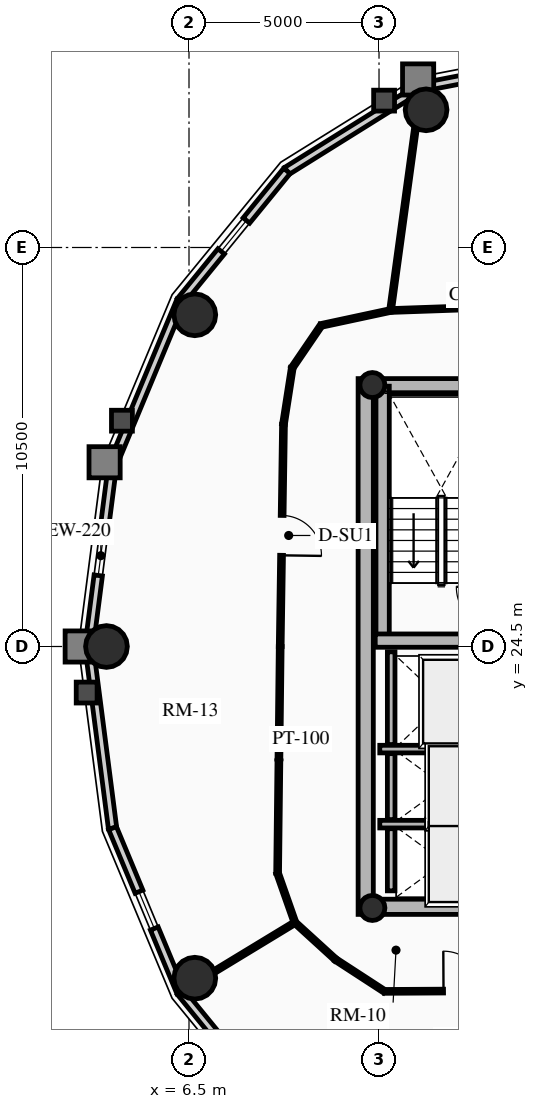
"""IFC4 building model, lengths in metres.
Left out: names, types, materials, properties, quantities, classifications, styles, units other than length and angle.
Written with IfcOpenShell. Run it as: python <this file> out.ifc"""

import sys

from ifc_helpers import new_model, si_unit, direction, frame, frame_2d, origin, origin_2d, place, context, subcontext, project, spatial, rectangle, circle, hollow_circle, extrude, source, transform, mapped, element, fill, save


model = new_model("IFC4")
c1 = context("Model", 3, precision=1e-05, world=origin(), true_north=direction((0.0, 1.0)))
c2 = subcontext(c1, "Body", "Model", "MODEL_VIEW")
j1 = project(units=[si_unit("LENGTHUNIT", "METRE"), si_unit("PLANEANGLEUNIT", "RADIAN")], contexts=[c1])
p1 = place(None, origin())
s1 = spatial("IfcSite", under=j1, at=p1, CompositionType="ELEMENT")
p2 = place(p1, origin())
s2 = spatial("IfcBuilding", under=s1, at=p2, CompositionType="ELEMENT")
p3 = place(p2, frame((0.0, 0.0, 202.48)))
s3 = spatial("IfcBuildingStorey", under=s2, at=p3, CompositionType="ELEMENT", Elevation=202.48)
p4 = place(p3, frame((11.15, 17.45, 0.0), z_axis=(0.0, 0.0, 1.0), x_axis=(0.0, 1.0, 0.0)))
e1 = element("IfcWall", 1, at=p4, inside=s3, PredefinedType="SHEAR", context=c2, shape_type="SweptSolid", body=[
    extrude(rectangle(XDim=14.1, YDim=0.4, at=frame_2d((7.05, 0.0))), origin(), (0.0, 0.0, 1.0), 2.91),
])
p5 = place(p3, frame((11.15, 17.65, 0.0), z_axis=(0.0, 0.0, 1.0), x_axis=(1.0, 0.0, 0.0)))
e2 = element("IfcWall", 2, at=p5, inside=s3, PredefinedType="SHEAR", context=c2, shape_type="SweptSolid", body=[
    extrude(rectangle(XDim=10.7, YDim=0.4, at=frame_2d((5.35, 0.0))), origin(), (0.0, 0.0, 1.0), 2.91),
])
m1 = source(origin(), c2, "Body", "SweptSolid", [
    extrude(rectangle(XDim=1.5, YDim=2.02, at=frame_2d((0.75, 1.01))), frame((0.0, 0.21, 0.0), z_axis=(0.0, -1.0, 0.0), x_axis=(1.0, 0.0, 0.0)), (0.0, 0.0, 1.0), 0.42),
])
p6 = place(p5, frame((5.45, 0.0, 0.0)))
e3 = element("IfcOpeningElement", 3, at=p6, cuts=e2, PredefinedType="OPENING", context=c2, shape_type="MappedRepresentation", body=[
    mapped(m1, transform((0.0, 0.0, 0.0), x_axis=(1.0, 0.0, 0.0), y_axis=(0.0, 1.0, 0.0), z_axis=(0.0, 0.0, 1.0), scale=1.0)),
])
p7 = place(p3, frame((11.15, 31.35, 0.0), z_axis=(0.0, 0.0, 1.0), x_axis=(1.0, 0.0, 0.0)))
e4 = element("IfcWall", 4, at=p7, inside=s3, PredefinedType="SHEAR", context=c2, shape_type="SweptSolid", body=[
    extrude(rectangle(XDim=10.7, YDim=0.4, at=frame_2d((5.35, 0.0))), origin(), (0.0, 0.0, 1.0), 2.91),
])
p8 = place(p7, frame((4.6, 0.0, 0.0)))
e5 = element("IfcOpeningElement", 5, at=p8, cuts=e4, PredefinedType="OPENING", context=c2, shape_type="MappedRepresentation", body=[
    mapped(m1, transform((0.0, 0.0, 0.0), x_axis=(1.0, 0.0, 0.0), y_axis=(0.0, 1.0, 0.0), z_axis=(0.0, 0.0, 1.0), scale=1.0)),
])
p9 = place(p3, frame((11.595, 24.655, 0.0), z_axis=(0.0, 0.0, 1.0), x_axis=(0.0, 1.0, 0.0)))
e6 = element("IfcWall", 6, at=p9, inside=s3, PredefinedType="SHEAR", context=c2, shape_type="SweptSolid", body=[
    extrude(rectangle(XDim=6.695, YDim=0.35, at=frame_2d((3.348, 0.0))), origin(), (0.0, 0.0, 1.0), 2.91),
])
p10 = place(p3, frame((11.4, 24.655, 0.0), z_axis=(0.0, 0.0, 1.0), x_axis=(1.0, 0.0, 0.0)))
e7 = element("IfcWall", 7, at=p10, inside=s3, PredefinedType="SHEAR", context=c2, shape_type="SweptSolid", body=[
    extrude(rectangle(XDim=3.285, YDim=0.35, at=frame_2d((1.643, 0.0))), origin(), (0.0, 0.0, 1.0), 2.91),
])
for number, where, z_axis, x_axis in (
    (8, (11.325, 17.62, 0.0), (0.0, 0.0, 1.0), (1.0, 0.0, 0.0)),
    (9, (11.325, 31.38, 0.0), (0.0, 0.0, 1.0), (1.0, 0.0, 0.0)),
):
    element("IfcColumn", number, at=place(p3, frame(where, z_axis=z_axis, x_axis=x_axis)), inside=s3, PredefinedType="COLUMN", context=c2, shape_type="SweptSolid", body=[
        extrude(hollow_circle(Radius=0.33, WallThickness=0.025, at=origin_2d()), origin(), (0.0, 0.0, 1.0), 2.91),
    ])
for number, where, z_axis, x_axis in (
    (10, (12.739, 38.623, 0.0), (0.0, 0.0, 1.0), (1.0, 0.0, 0.0)),
    (11, (6.653, 33.229, 0.0), (0.0, 0.0, 1.0), (1.0, 0.0, 0.0)),
    (12, (4.328, 24.5, 0.0), (0.0, 0.0, 1.0), (1.0, 0.0, 0.0)),
    (13, (6.653, 15.771, 0.0), (0.0, 0.0, 1.0), (1.0, 0.0, 0.0)),
):
    element("IfcColumn", number, at=place(p3, frame(where, z_axis=z_axis, x_axis=x_axis)), inside=s3, PredefinedType="USERDEFINED", context=c2, shape_type="SweptSolid", body=[
        extrude(circle(Radius=0.55, at=origin_2d()), origin(), (0.0, 0.0, 1.0), 2.91),
    ])
p11 = place(p3, frame((12.597, 39.213, 0.0), z_axis=(0.0, 0.0, 1.0), x_axis=(0.981700307484, 0.190432419211, 0.0)))
e14 = element("IfcWall", 14, at=p11, inside=s3, PredefinedType="SOLIDWALL", context=c2, shape_type="SweptSolid", body=[
    extrude(rectangle(XDim=3.976, YDim=0.22, at=frame_2d((1.988, 0.0))), origin(), (0.0, 0.0, 1.0), 2.322),
])
m2 = source(origin(), c2, "Body", "SweptSolid", [
    extrude(rectangle(XDim=1.05, YDim=1.3, at=frame_2d((0.525, 0.65))), frame((0.0, 0.12, 0.0), z_axis=(0.0, -1.0, 0.0), x_axis=(1.0, 0.0, 0.0)), (0.0, 0.0, 1.0), 0.24),
])
p12 = place(p11, frame((1.463, 0.0, 0.65)))
e15 = element("IfcOpeningElement", 15, at=p12, cuts=e14, PredefinedType="OPENING", context=c2, shape_type="MappedRepresentation", body=[
    mapped(m2, transform((0.0, 0.0, 0.0), x_axis=(1.0, 0.0, 0.0), y_axis=(0.0, 1.0, 0.0), z_axis=(0.0, 0.0, 1.0), scale=1.0)),
])
p13 = place(p3, frame((9.076, 37.015, 0.0), z_axis=(0.0, 0.0, 1.0), x_axis=(0.848318713376, 0.529485939886, 0.0)))
e16 = element("IfcWall", 16, at=p13, inside=s3, PredefinedType="SOLIDWALL", context=c2, shape_type="SweptSolid", body=[
    extrude(rectangle(XDim=4.15, YDim=0.22, at=frame_2d((2.075, 0.0))), origin(), (0.0, 0.0, 1.0), 2.322),
])
p14 = place(p3, frame((6.282, 33.593, 0.0), z_axis=(0.0, 0.0, 1.0), x_axis=(0.632467166636, 0.774587169483, 0.0)))
e17 = element("IfcWall", 17, at=p14, inside=s3, PredefinedType="SOLIDWALL", context=c2, shape_type="SweptSolid", body=[
    extrude(rectangle(XDim=4.418, YDim=0.22, at=frame_2d((2.209, 0.0))), origin(), (0.0, 0.0, 1.0), 2.322),
])
p15 = place(p14, frame((1.684, 0.0, 0.65)))
e18 = element("IfcOpeningElement", 18, at=p15, cuts=e17, PredefinedType="OPENING", context=c2, shape_type="MappedRepresentation", body=[
    mapped(m2, transform((0.0, 0.0, 0.0), x_axis=(1.0, 0.0, 0.0), y_axis=(0.0, 1.0, 0.0), z_axis=(0.0, 0.0, 1.0), scale=1.0)),
])
p16 = place(p3, frame((4.488, 29.281, 0.0), z_axis=(0.0, 0.0, 1.0), x_axis=(0.384036305194, 0.923317993052, 0.0)))
e19 = element("IfcWall", 19, at=p16, inside=s3, PredefinedType="SOLIDWALL", context=c2, shape_type="SweptSolid", body=[
    extrude(rectangle(XDim=4.671, YDim=0.22, at=frame_2d((2.335, 0.0))), origin(), (0.0, 0.0, 1.0), 2.322),
])
p17 = place(p3, frame((3.87, 24.5, 0.0), z_axis=(0.0, 0.0, 1.0), x_axis=(0.128241318541, 0.991742993027, 0.0)))
e20 = element("IfcWall", 20, at=p17, inside=s3, PredefinedType="SOLIDWALL", context=c2, shape_type="SweptSolid", body=[
    extrude(rectangle(XDim=4.82, YDim=0.22, at=frame_2d((2.41, 0.0))), origin(), (0.0, 0.0, 1.0), 2.322),
])
p18 = place(p17, frame((1.885, 0.0, 0.65)))
e21 = element("IfcOpeningElement", 21, at=p18, cuts=e20, PredefinedType="OPENING", context=c2, shape_type="MappedRepresentation", body=[
    mapped(m2, transform((0.0, 0.0, 0.0), x_axis=(1.0, 0.0, 0.0), y_axis=(0.0, 1.0, 0.0), z_axis=(0.0, 0.0, 1.0), scale=1.0)),
])
p19 = place(p3, frame((4.488, 19.719, 0.0), z_axis=(0.0, 0.0, 1.0), x_axis=(-0.128241318541, 0.991742993027, 0.0)))
e22 = element("IfcWall", 22, at=p19, inside=s3, PredefinedType="SOLIDWALL", context=c2, shape_type="SweptSolid", body=[
    extrude(rectangle(XDim=4.82, YDim=0.22, at=frame_2d((2.41, 0.0))), origin(), (0.0, 0.0, 1.0), 2.322),
])
p20 = place(p3, frame((6.282, 15.407, 0.0), z_axis=(0.0, 0.0, 1.0), x_axis=(-0.384036305194, 0.923317993052, 0.0)))
e23 = element("IfcWall", 23, at=p20, inside=s3, PredefinedType="SOLIDWALL", context=c2, shape_type="SweptSolid", body=[
    extrude(rectangle(XDim=4.671, YDim=0.22, at=frame_2d((2.335, 0.0))), origin(), (0.0, 0.0, 1.0), 2.322),
])
p21 = place(p20, frame((1.81, 0.0, 0.65)))
e24 = element("IfcOpeningElement", 24, at=p21, cuts=e23, PredefinedType="OPENING", context=c2, shape_type="MappedRepresentation", body=[
    mapped(m2, transform((0.0, 0.0, 0.0), x_axis=(1.0, 0.0, 0.0), y_axis=(0.0, 1.0, 0.0), z_axis=(0.0, 0.0, 1.0), scale=1.0)),
])
p22 = place(p3, frame((9.076, 11.985, 0.0), z_axis=(0.0, 0.0, 1.0), x_axis=(-0.632467166636, 0.774587169483, 0.0)))
e25 = element("IfcWall", 25, at=p22, inside=s3, PredefinedType="SOLIDWALL", context=c2, shape_type="SweptSolid", body=[
    extrude(rectangle(XDim=4.418, YDim=0.22, at=frame_2d((2.209, 0.0))), origin(), (0.0, 0.0, 1.0), 2.322),
])
p23 = place(p3, frame((11.52, 21.8, 0.0), z_axis=(0.0, 0.0, 1.0), x_axis=(1.0, 0.0, 0.0)))
e26 = element("IfcWall", 26, at=p23, inside=s3, PredefinedType="SHEAR", context=c2, shape_type="SweptSolid", body=[
    extrude(rectangle(XDim=2.97, YDim=0.2, at=frame_2d((1.485, 0.0))), origin(), (0.0, 0.0, 1.0), 2.91),
])
p24 = place(p3, frame((11.82, 21.92, 0.0), z_axis=(0.0, 0.0, 1.0), x_axis=(0.0, 1.0, 0.0)))
e27 = element("IfcWall", 27, at=p24, inside=s3, PredefinedType="SHEAR", context=c2, shape_type="SweptSolid", body=[
    extrude(rectangle(XDim=2.44, YDim=0.2, at=frame_2d((1.22, 0.0))), origin(), (0.0, 0.0, 1.0), 2.91),
])
p25 = place(p3, frame((11.52, 19.825, 0.0), z_axis=(0.0, 0.0, 1.0), x_axis=(1.0, 0.0, 0.0)))
e28 = element("IfcWall", 28, at=p25, inside=s3, PredefinedType="SHEAR", context=c2, shape_type="SweptSolid", body=[
    extrude(rectangle(XDim=2.97, YDim=0.2, at=frame_2d((1.485, 0.0))), origin(), (0.0, 0.0, 1.0), 2.91),
])
p26 = place(p3, frame((11.82, 19.945, 0.0), z_axis=(0.0, 0.0, 1.0), x_axis=(0.0, 1.0, 0.0)))
e29 = element("IfcWall", 29, at=p26, inside=s3, PredefinedType="SHEAR", context=c2, shape_type="SweptSolid", body=[
    extrude(rectangle(XDim=1.735, YDim=0.2, at=frame_2d((0.867, 0.0))), origin(), (0.0, 0.0, 1.0), 2.91),
])
p27 = place(p3, frame((11.82, 18.07, 0.0), z_axis=(0.0, 0.0, 1.0), x_axis=(0.0, 1.0, 0.0)))
e30 = element("IfcWall", 30, at=p27, inside=s3, PredefinedType="SHEAR", context=c2, shape_type="SweptSolid", body=[
    extrude(rectangle(XDim=1.635, YDim=0.2, at=frame_2d((0.817, 0.0))), origin(), (0.0, 0.0, 1.0), 2.91),
])
p28 = place(p3, frame((18.082, 33.56, 0.0), z_axis=(0.0, 0.0, 1.0), x_axis=(-0.999399009709, -0.034664382185, 0.0)))
e31 = element("IfcWall", 31, at=p28, inside=s3, PredefinedType="MOVABLE", context=c2, shape_type="SweptSolid", body=[
    extrude(rectangle(XDim=6.282, YDim=0.1, at=frame_2d((3.141, 0.0))), origin(), (0.0, 0.0, 1.0), 2.255),
])
p29 = place(p3, frame((11.803, 33.342, 0.0), z_axis=(0.0, 0.0, 1.0), x_axis=(-0.977750742783, -0.209770076483, 0.0)))
e32 = element("IfcWall", 32, at=p29, inside=s3, PredefinedType="MOVABLE", context=c2, shape_type="SweptSolid", body=[
    extrude(rectangle(XDim=1.868, YDim=0.1, at=frame_2d((0.934, 0.0))), origin(), (0.0, 0.0, 1.0), 2.255),
])
p30 = place(p3, frame((9.977, 32.95, 0.0), z_axis=(0.0, 0.0, 1.0), x_axis=(-0.563291804539, -0.826258036535, 0.0)))
e33 = element("IfcWall", 33, at=p30, inside=s3, PredefinedType="MOVABLE", context=c2, shape_type="SweptSolid", body=[
    extrude(rectangle(XDim=1.346, YDim=0.1, at=frame_2d((0.673, 0.0))), origin(), (0.0, 0.0, 1.0), 2.322),
])
p31 = place(p3, frame((9.219, 31.838, 0.0), z_axis=(0.0, 0.0, 1.0), x_axis=(-0.154065528966, -0.98806063214, 0.0)))
e34 = element("IfcWall", 34, at=p31, inside=s3, PredefinedType="MOVABLE", context=c2, shape_type="SweptSolid", body=[
    extrude(rectangle(XDim=1.507, YDim=0.1, at=frame_2d((0.753, 0.0))), origin(), (0.0, 0.0, 1.0), 2.255),
])
p32 = place(p3, frame((8.986, 30.349, 0.0), z_axis=(0.0, 0.0, 1.0), x_axis=(-0.014775478218, -0.999890836663, 0.0)))
e35 = element("IfcWall", 35, at=p32, inside=s3, PredefinedType="MOVABLE", context=c2, shape_type="SweptSolid", body=[
    extrude(rectangle(XDim=5.849, YDim=0.1, at=frame_2d((2.925, 0.0))), origin(), (0.0, 0.0, 1.0), 2.685),
])
m3 = source(origin(), c2, "Body", "SweptSolid", [
    extrude(rectangle(XDim=1.05, YDim=2.015, at=frame_2d((0.525, 1.007))), frame((0.0, 0.06, 0.0), z_axis=(0.0, -1.0, 0.0), x_axis=(1.0, 0.0, 0.0)), (0.0, 0.0, 1.0), 0.12),
])
p33 = place(p32, frame((2.4, 0.0, 0.0)))
e36 = element("IfcOpeningElement", 36, at=p33, cuts=e35, PredefinedType="OPENING", context=c2, shape_type="MappedRepresentation", body=[
    mapped(m3, transform((0.0, 0.0, 0.0), x_axis=(1.0, 0.0, 0.0), y_axis=(0.0, 1.0, 0.0), z_axis=(0.0, 0.0, 1.0), scale=1.0)),
])
p34 = place(p3, frame((8.9, 24.5, 0.0), z_axis=(0.0, 0.0, 1.0), x_axis=(-0.011416369353, -0.999934831132, 0.0)))
e37 = element("IfcWall", 37, at=p34, inside=s3, PredefinedType="MOVABLE", context=c2, shape_type="SweptSolid", body=[
    extrude(rectangle(XDim=5.967, YDim=0.1, at=frame_2d((2.983, 0.0))), origin(), (0.0, 0.0, 1.0), 2.322),
])
p35 = place(p3, frame((8.832, 18.534, 0.0), z_axis=(0.0, 0.0, 1.0), x_axis=(0.332031819657, -0.943268186008, 0.0)))
e38 = element("IfcWall", 38, at=p35, inside=s3, PredefinedType="MOVABLE", context=c2, shape_type="SweptSolid", body=[
    extrude(rectangle(XDim=1.377, YDim=0.1, at=frame_2d((0.688, 0.0))), origin(), (0.0, 0.0, 1.0), 2.255),
])
p36 = place(p3, frame((9.289, 17.235, 0.0), z_axis=(0.0, 0.0, 1.0), x_axis=(0.739015164946, -0.673688790155, 0.0)))
e39 = element("IfcWall", 39, at=p36, inside=s3, PredefinedType="MOVABLE", context=c2, shape_type="SweptSolid", body=[
    extrude(rectangle(XDim=1.446, YDim=0.1, at=frame_2d((0.723, 0.0))), origin(), (0.0, 0.0, 1.0), 2.322),
])
p37 = place(p3, frame((10.358, 16.26, 0.0), z_axis=(0.0, 0.0, 1.0), x_axis=(0.838265397059, -0.545262435983, 0.0)))
e40 = element("IfcWall", 40, at=p37, inside=s3, PredefinedType="MOVABLE", context=c2, shape_type="SweptSolid", body=[
    extrude(rectangle(XDim=1.534, YDim=0.1, at=frame_2d((0.767, 0.0))), origin(), (0.0, 0.0, 1.0), 2.255),
])
p38 = place(p3, frame((11.644, 15.424, 0.0), z_axis=(0.0, 0.0, 1.0), x_axis=(0.999986552511, 0.005186019339, 0.0)))
e41 = element("IfcWall", 41, at=p38, inside=s3, PredefinedType="MOVABLE", context=c2, shape_type="SweptSolid", body=[
    extrude(rectangle(XDim=3.201, YDim=0.1, at=frame_2d((1.601, 0.0))), origin(), (0.0, 0.0, 1.0), 2.322),
])
p39 = place(p38, frame((1.553, 0.0, 0.0)))
e42 = element("IfcOpeningElement", 42, at=p39, cuts=e41, PredefinedType="OPENING", context=c2, shape_type="MappedRepresentation", body=[
    mapped(m3, transform((0.0, 0.0, 0.0), x_axis=(1.0, 0.0, 0.0), y_axis=(0.0, 1.0, 0.0), z_axis=(0.0, 0.0, 1.0), scale=1.0)),
])
p40 = place(p3, frame((11.803, 33.342, 0.0), z_axis=(0.0, 0.0, 1.0), x_axis=(0.135452591041, 0.990783828885, 0.0)))
e43 = element("IfcWall", 43, at=p40, inside=s3, PredefinedType="MOVABLE", context=c2, shape_type="SweptSolid", body=[
    extrude(rectangle(XDim=5.906, YDim=0.1, at=frame_2d((2.953, 0.0))), origin(), (0.0, 0.0, 1.0), 2.322),
])
p41 = place(p3, frame((9.289, 17.235, 0.0), z_axis=(0.0, 0.0, 1.0), x_axis=(-0.854741081983, -0.519054604806, 0.0)))
e44 = element("IfcWall", 44, at=p41, inside=s3, PredefinedType="MOVABLE", context=c2, shape_type="SweptSolid", body=[
    extrude(rectangle(XDim=3.499, YDim=0.1, at=frame_2d((1.75, 0.0))), origin(), (0.0, 0.0, 1.0), 2.322),
])
m4 = source(origin(), c2, "Body", "SweptSolid", [
    extrude(rectangle(XDim=1.05, YDim=1.3, at=frame_2d((0.525, 0.65))), frame((0.0, 0.03, 0.0), z_axis=(0.0, -1.0, 0.0), x_axis=(1.0, 0.0, 0.0)), (0.0, 0.0, 1.0), 0.06),
])
p42 = place(p15, origin())
e45 = element("IfcWindow", 45, at=p42, inside=s3, PartitioningType="SINGLE_PANEL", PredefinedType="WINDOW", context=c2, shape_type="MappedRepresentation", body=[
    mapped(m4, transform((0.0, 0.0, 0.0), x_axis=(1.0, 0.0, 0.0), y_axis=(0.0, 1.0, 0.0), z_axis=(0.0, 0.0, 1.0), scale=1.0)),
])
fill(e18, e45)
p43 = place(p18, origin())
e46 = element("IfcWindow", 46, at=p43, inside=s3, PartitioningType="SINGLE_PANEL", PredefinedType="WINDOW", context=c2, shape_type="MappedRepresentation", body=[
    mapped(m4, transform((0.0, 0.0, 0.0), x_axis=(1.0, 0.0, 0.0), y_axis=(0.0, 1.0, 0.0), z_axis=(0.0, 0.0, 1.0), scale=1.0)),
])
fill(e21, e46)
p44 = place(p21, origin())
e47 = element("IfcWindow", 47, at=p44, inside=s3, PartitioningType="SINGLE_PANEL", PredefinedType="WINDOW", context=c2, shape_type="MappedRepresentation", body=[
    mapped(m4, transform((0.0, 0.0, 0.0), x_axis=(1.0, 0.0, 0.0), y_axis=(0.0, 1.0, 0.0), z_axis=(0.0, 0.0, 1.0), scale=1.0)),
])
fill(e24, e47)
m5 = source(origin(), c2, "Body", "SweptSolid", [
    extrude(rectangle(XDim=1.05, YDim=2.015, at=frame_2d((0.525, 1.007))), frame((0.0, 0.025, 0.0), z_axis=(0.0, -1.0, 0.0), x_axis=(1.0, 0.0, 0.0)), (0.0, 0.0, 1.0), 0.05),
])
p45 = place(p33, origin())
e48 = element("IfcDoor", 48, at=p45, inside=s3, OperationType="SINGLE_SWING_RIGHT", PredefinedType="DOOR", context=c2, shape_type="MappedRepresentation", body=[
    mapped(m5, transform((0.0, 0.0, 0.0), x_axis=(1.0, 0.0, 0.0), y_axis=(0.0, 1.0, 0.0), z_axis=(0.0, 0.0, 1.0), scale=1.0)),
])
fill(e36, e48)
p46 = place(p39, origin())
e49 = element("IfcDoor", 49, at=p46, inside=s3, OperationType="SINGLE_SWING_LEFT", PredefinedType="DOOR", context=c2, shape_type="MappedRepresentation", body=[
    mapped(m5, transform((0.0, 0.0, 0.0), x_axis=(1.0, 0.0, 0.0), y_axis=(0.0, 1.0, 0.0), z_axis=(0.0, 0.0, 1.0), scale=1.0)),
])
fill(e42, e49)
save(model, sys.argv[1])
